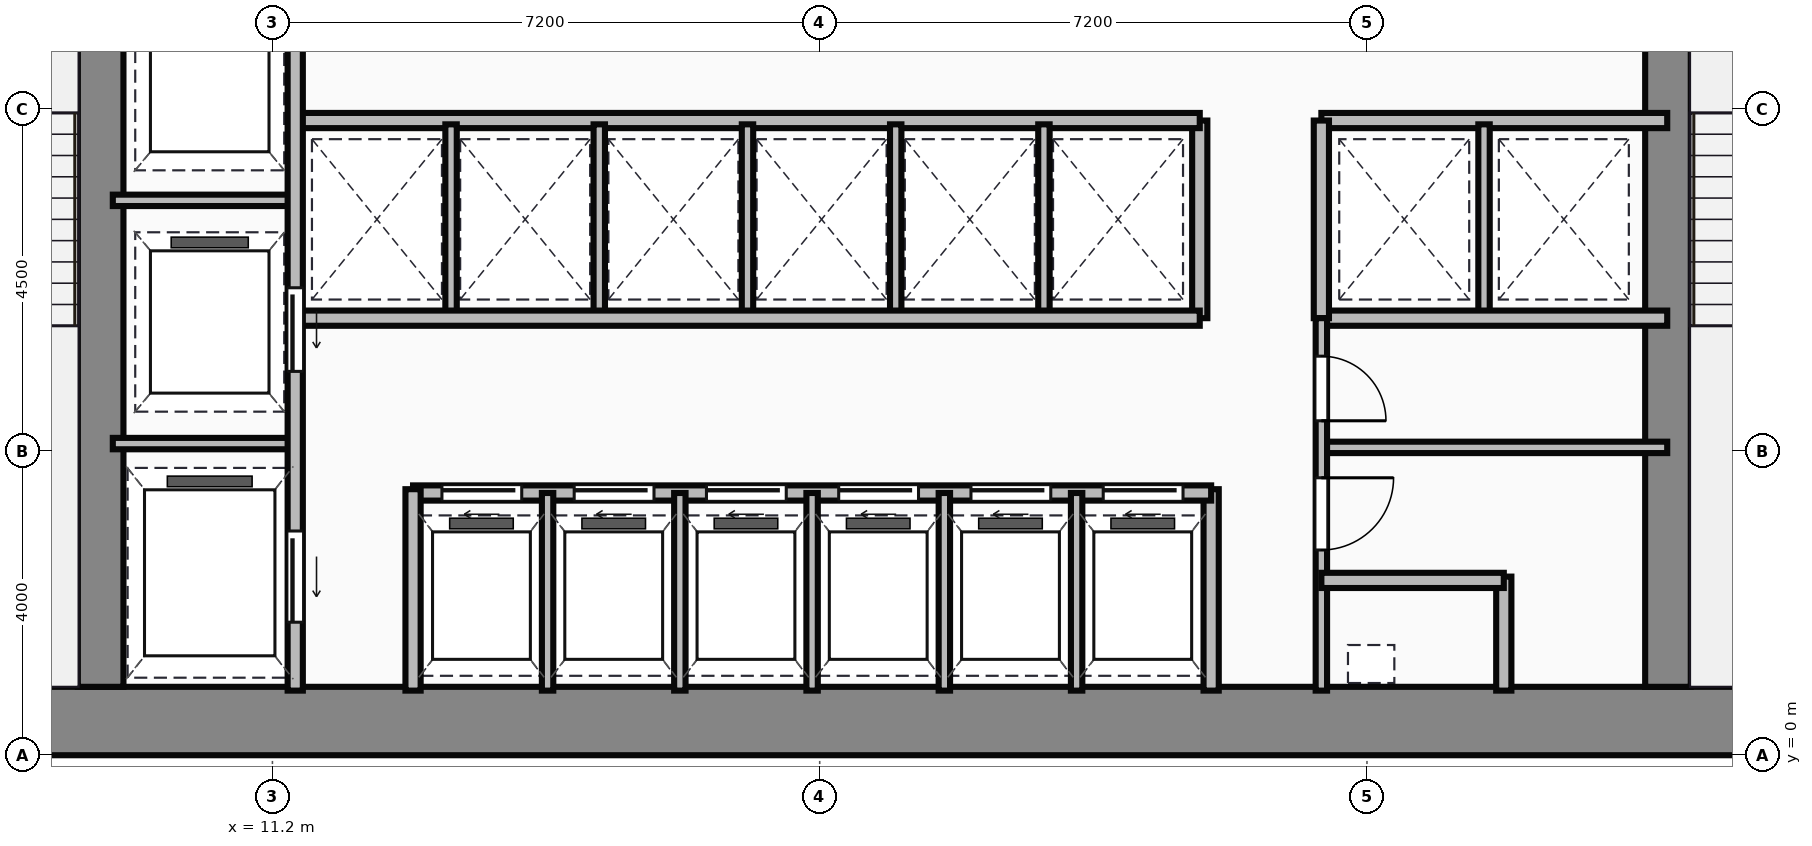
"""IFC4 building model, lengths in metres.
Left out: names, types, materials, properties, quantities, classifications, styles, units other than length and angle.
Written with IfcOpenShell. Run it as: python <this file> out.ifc"""

import sys

from ifc_helpers import new_model, si_unit, direction, frame, frame_2d, origin, place, context, subcontext, project, spatial, rectangle, extrude, source, transform, mapped, element, fill, save


model = new_model("IFC4")
c1 = context("Model", 3, precision=1e-05, world=origin(), true_north=direction((0.0, 1.0)))
c2 = subcontext(c1, "Body", "Model", "MODEL_VIEW")
j1 = project(units=[si_unit("LENGTHUNIT", "METRE"), si_unit("PLANEANGLEUNIT", "RADIAN")], contexts=[c1])
p1 = place(None, origin())
s1 = spatial("IfcSite", under=j1, at=p1, CompositionType="ELEMENT")
p2 = place(p1, origin())
s2 = spatial("IfcBuilding", under=s1, at=p2, CompositionType="ELEMENT")
p3 = place(p2, frame((0.0, 0.0, 54.4)))
s3 = spatial("IfcBuildingStorey", under=s2, at=p3, CompositionType="ELEMENT", Elevation=54.4)
m1 = source(origin(), c2, "Body", "SweptSolid", [
    extrude(rectangle(XDim=29.5, YDim=0.9, at=frame_2d((14.75, 0.0))), origin(), (0.0, 0.0, 1.0), 3.65),
])
p4 = place(p3, frame((4.5, 0.45, 0.0), z_axis=(0.0, 0.0, 1.0), x_axis=(1.0, 0.0, 0.0)))
e1 = element("IfcWall", 1, at=p4, inside=s3, PredefinedType="SHEAR", context=c2, shape_type="MappedRepresentation", body=[
    mapped(m1, transform((0.0, 0.0, 0.0))),
])
m2 = source(origin(), c2, "Body", "SweptSolid", [
    extrude(rectangle(XDim=12.2, YDim=0.6, at=frame_2d((6.1, 0.0))), origin(), (0.0, 0.0, 1.0), 3.65),
])
for number, where, z_axis, x_axis in (
    (2, (8.94, 0.9, 0.0), (0.0, 0.0, 1.0), (0.0, 1.0, 0.0)),
    (3, (29.56, 0.9, 0.0), (0.0, 0.0, 1.0), (0.0, 1.0, 0.0)),
):
    element("IfcWall", number, at=place(p3, frame(where, z_axis=z_axis, x_axis=x_axis)), inside=s3, PredefinedType="SHEAR", context=c2, shape_type="MappedRepresentation", body=[
        mapped(m2, transform((0.0, 0.0, 0.0))),
    ])
m3 = source(origin(), c2, "Body", "SweptSolid", [
    extrude(rectangle(XDim=9.6, YDim=0.2, at=frame_2d((4.8, 0.0))), origin(), (0.0, 0.0, 1.0), 3.4),
])
p5 = place(p3, frame((11.5, 0.85, 0.0), z_axis=(0.0, 0.0, 1.0), x_axis=(0.0, 1.0, 0.0)))
e4 = element("IfcWall", 4, at=p5, inside=s3, PredefinedType="PARTITIONING", context=c2, shape_type="MappedRepresentation", body=[
    mapped(m3, transform((0.0, 0.0, 0.0))),
])
p6 = place(p5, frame((4.2, 0.0, 0.0)))
e5 = element("IfcOpeningElement", 5, at=p6, cuts=e4, PredefinedType="OPENING", context=c2, shape_type="SweptSolid", body=[
    extrude(rectangle(XDim=1.1, YDim=2.15, at=frame_2d((0.55, 1.075))), frame((0.0, 0.11, 0.0), z_axis=(0.0, -1.0, 0.0), x_axis=(1.0, 0.0, 0.0)), (0.0, 0.0, 1.0), 0.22),
])
p7 = place(p5, frame((0.9, 0.0, 0.0)))
e6 = element("IfcOpeningElement", 6, at=p7, cuts=e4, PredefinedType="OPENING", context=c2, shape_type="SweptSolid", body=[
    extrude(rectangle(XDim=1.2, YDim=2.15, at=frame_2d((0.6, 1.075))), frame((0.0, 0.11, 0.0), z_axis=(0.0, -1.0, 0.0), x_axis=(1.0, 0.0, 0.0)), (0.0, 0.0, 1.0), 0.22),
])
m4 = source(origin(), c2, "Body", "SweptSolid", [
    extrude(rectangle(XDim=2.4, YDim=0.15, at=frame_2d((1.2, 0.0))), origin(), (0.0, 0.0, 1.0), 3.4),
])
for number, where, z_axis, x_axis in (
    (7, (9.1, 4.1, 0.0), (0.0, 0.0, 1.0), (1.0, 0.0, 0.0)),
    (8, (9.1, 7.3, 0.0), (0.0, 0.0, 1.0), (1.0, 0.0, 0.0)),
):
    element("IfcWall", number, at=place(p3, frame(where, z_axis=z_axis, x_axis=x_axis)), inside=s3, PredefinedType="PARTITIONING", context=c2, shape_type="MappedRepresentation", body=[
        mapped(m4, transform((0.0, 0.0, 0.0))),
    ])
m5 = source(origin(), c2, "Body", "SweptSolid", [
    extrude(rectangle(XDim=2.65, YDim=0.2, at=frame_2d((1.325, 0.0))), origin(), (0.0, 0.0, 1.0), 3.4),
])
p8 = place(p3, frame((13.05, 0.85, 0.0), z_axis=(0.0, 0.0, 1.0), x_axis=(0.0, 1.0, 0.0)))
e9 = element("IfcWall", 9, at=p8, inside=s3, PredefinedType="PARTITIONING", context=c2, shape_type="MappedRepresentation", body=[
    mapped(m5, transform((0.0, 0.0, 0.0))),
])
m6 = source(origin(), c2, "Body", "SweptSolid", [
    extrude(rectangle(XDim=10.5, YDim=0.2, at=frame_2d((5.25, 0.0))), origin(), (0.0, 0.0, 1.0), 3.4),
])
p9 = place(p3, frame((13.05, 3.45, 0.0), z_axis=(0.0, 0.0, 1.0), x_axis=(1.0, 0.0, 0.0)))
e10 = element("IfcWall", 10, at=p9, inside=s3, PredefinedType="PARTITIONING", context=c2, shape_type="MappedRepresentation", body=[
    mapped(m6, transform((0.0, 0.0, 0.0))),
])
p10 = place(p9, frame((0.38, 0.0, 0.0)))
e11 = element("IfcOpeningElement", 11, at=p10, cuts=e10, PredefinedType="OPENING", context=c2, shape_type="SweptSolid", body=[
    extrude(rectangle(XDim=1.05, YDim=2.15, at=frame_2d((0.525, 1.075))), frame((0.0, 0.11, 0.0), z_axis=(0.0, -1.0, 0.0), x_axis=(1.0, 0.0, 0.0)), (0.0, 0.0, 1.0), 0.22),
])
p11 = place(p9, frame((2.12, 0.0, 0.0)))
e12 = element("IfcOpeningElement", 12, at=p11, cuts=e10, PredefinedType="OPENING", context=c2, shape_type="SweptSolid", body=[
    extrude(rectangle(XDim=1.05, YDim=2.15, at=frame_2d((0.525, 1.075))), frame((0.0, 0.11, 0.0), z_axis=(0.0, -1.0, 0.0), x_axis=(1.0, 0.0, 0.0)), (0.0, 0.0, 1.0), 0.22),
])
p12 = place(p9, frame((3.86, 0.0, 0.0)))
e13 = element("IfcOpeningElement", 13, at=p12, cuts=e10, PredefinedType="OPENING", context=c2, shape_type="SweptSolid", body=[
    extrude(rectangle(XDim=1.05, YDim=2.15, at=frame_2d((0.525, 1.075))), frame((0.0, 0.11, 0.0), z_axis=(0.0, -1.0, 0.0), x_axis=(1.0, 0.0, 0.0)), (0.0, 0.0, 1.0), 0.22),
])
p13 = place(p9, frame((5.6, 0.0, 0.0)))
e14 = element("IfcOpeningElement", 14, at=p13, cuts=e10, PredefinedType="OPENING", context=c2, shape_type="SweptSolid", body=[
    extrude(rectangle(XDim=1.05, YDim=2.15, at=frame_2d((0.525, 1.075))), frame((0.0, 0.11, 0.0), z_axis=(0.0, -1.0, 0.0), x_axis=(1.0, 0.0, 0.0)), (0.0, 0.0, 1.0), 0.22),
])
p14 = place(p9, frame((7.34, 0.0, 0.0)))
e15 = element("IfcOpeningElement", 15, at=p14, cuts=e10, PredefinedType="OPENING", context=c2, shape_type="SweptSolid", body=[
    extrude(rectangle(XDim=1.05, YDim=2.15, at=frame_2d((0.525, 1.075))), frame((0.0, 0.11, 0.0), z_axis=(0.0, -1.0, 0.0), x_axis=(1.0, 0.0, 0.0)), (0.0, 0.0, 1.0), 0.22),
])
p15 = place(p9, frame((9.08, 0.0, 0.0)))
e16 = element("IfcOpeningElement", 16, at=p15, cuts=e10, PredefinedType="OPENING", context=c2, shape_type="SweptSolid", body=[
    extrude(rectangle(XDim=1.05, YDim=2.15, at=frame_2d((0.525, 1.075))), frame((0.0, 0.11, 0.0), z_axis=(0.0, -1.0, 0.0), x_axis=(1.0, 0.0, 0.0)), (0.0, 0.0, 1.0), 0.22),
])
p16 = place(p3, frame((23.55, 0.85, 0.0), z_axis=(0.0, 0.0, 1.0), x_axis=(0.0, 1.0, 0.0)))
e17 = element("IfcWall", 17, at=p16, inside=s3, PredefinedType="PARTITIONING", context=c2, shape_type="MappedRepresentation", body=[
    mapped(m5, transform((0.0, 0.0, 0.0))),
])
m7 = source(origin(), c2, "Body", "SweptSolid", [
    extrude(rectangle(XDim=2.6, YDim=0.15, at=frame_2d((1.3, 0.0))), origin(), (0.0, 0.0, 1.0), 3.4),
])
for number, where, z_axis, x_axis in (
    (18, (14.82, 0.85, 0.0), (0.0, 0.0, 1.0), (0.0, 1.0, 0.0)),
    (19, (16.56, 0.85, 0.0), (0.0, 0.0, 1.0), (0.0, 1.0, 0.0)),
    (20, (18.3, 0.85, 0.0), (0.0, 0.0, 1.0), (0.0, 1.0, 0.0)),
    (21, (20.04, 0.85, 0.0), (0.0, 0.0, 1.0), (0.0, 1.0, 0.0)),
    (22, (21.78, 0.85, 0.0), (0.0, 0.0, 1.0), (0.0, 1.0, 0.0)),
):
    element("IfcWall", number, at=place(p3, frame(where, z_axis=z_axis, x_axis=x_axis)), inside=s3, PredefinedType="PARTITIONING", context=c2, shape_type="MappedRepresentation", body=[
        mapped(m7, transform((0.0, 0.0, 0.0))),
    ])
m8 = source(origin(), c2, "Body", "SweptSolid", [
    extrude(rectangle(XDim=11.85, YDim=0.2, at=frame_2d((5.925, 0.0))), origin(), (0.0, 0.0, 1.0), 3.4),
])
for number, where, z_axis, x_axis in (
    (23, (11.55, 5.75, 0.0), (0.0, 0.0, 1.0), (1.0, 0.0, 0.0)),
    (24, (11.55, 8.35, 0.0), (0.0, 0.0, 1.0), (1.0, 0.0, 0.0)),
):
    element("IfcWall", number, at=place(p3, frame(where, z_axis=z_axis, x_axis=x_axis)), inside=s3, PredefinedType="PARTITIONING", context=c2, shape_type="MappedRepresentation", body=[
        mapped(m8, transform((0.0, 0.0, 0.0))),
    ])
m9 = source(origin(), c2, "Body", "SweptSolid", [
    extrude(rectangle(XDim=2.6, YDim=0.2, at=frame_2d((1.3, 0.0))), origin(), (0.0, 0.0, 1.0), 3.4),
])
p17 = place(p3, frame((23.4, 5.75, 0.0), z_axis=(0.0, 0.0, 1.0), x_axis=(0.0, 1.0, 0.0)))
e25 = element("IfcWall", 25, at=p17, inside=s3, PredefinedType="PARTITIONING", context=c2, shape_type="MappedRepresentation", body=[
    mapped(m9, transform((0.0, 0.0, 0.0))),
])
m10 = source(origin(), c2, "Body", "SweptSolid", [
    extrude(rectangle(XDim=2.5, YDim=0.15, at=frame_2d((1.25, 0.0))), origin(), (0.0, 0.0, 1.0), 3.4),
])
for number, where, z_axis, x_axis in (
    (26, (13.55, 5.8, 0.0), (0.0, 0.0, 1.0), (0.0, 1.0, 0.0)),
    (27, (15.5, 5.8, 0.0), (0.0, 0.0, 1.0), (0.0, 1.0, 0.0)),
    (28, (17.45, 5.8, 0.0), (0.0, 0.0, 1.0), (0.0, 1.0, 0.0)),
    (29, (19.4, 5.8, 0.0), (0.0, 0.0, 1.0), (0.0, 1.0, 0.0)),
    (30, (21.35, 5.8, 0.0), (0.0, 0.0, 1.0), (0.0, 1.0, 0.0)),
):
    element("IfcWall", number, at=place(p3, frame(where, z_axis=z_axis, x_axis=x_axis)), inside=s3, PredefinedType="PARTITIONING", context=c2, shape_type="MappedRepresentation", body=[
        mapped(m10, transform((0.0, 0.0, 0.0))),
    ])
m11 = source(origin(), c2, "Body", "SweptSolid", [
    extrude(rectangle(XDim=4.55, YDim=0.2, at=frame_2d((2.275, 0.0))), origin(), (0.0, 0.0, 1.0), 3.4),
])
for number, where, z_axis, x_axis in (
    (31, (25.0, 8.35, 0.0), (0.0, 0.0, 1.0), (1.0, 0.0, 0.0)),
    (32, (25.0, 5.75, 0.0), (0.0, 0.0, 1.0), (1.0, 0.0, 0.0)),
):
    element("IfcWall", number, at=place(p3, frame(where, z_axis=z_axis, x_axis=x_axis)), inside=s3, PredefinedType="PARTITIONING", context=c2, shape_type="MappedRepresentation", body=[
        mapped(m11, transform((0.0, 0.0, 0.0))),
    ])
p18 = place(p3, frame((25.0, 5.75, 0.0), z_axis=(0.0, 0.0, 1.0), x_axis=(0.0, 1.0, 0.0)))
e33 = element("IfcWall", 33, at=p18, inside=s3, PredefinedType="PARTITIONING", context=c2, shape_type="MappedRepresentation", body=[
    mapped(m9, transform((0.0, 0.0, 0.0))),
])
p19 = place(p3, frame((27.14, 5.8, 0.0), z_axis=(0.0, 0.0, 1.0), x_axis=(0.0, 1.0, 0.0)))
e34 = element("IfcWall", 34, at=p19, inside=s3, PredefinedType="PARTITIONING", context=c2, shape_type="MappedRepresentation", body=[
    mapped(m10, transform((0.0, 0.0, 0.0))),
])
m12 = source(origin(), c2, "Body", "SweptSolid", [
    extrude(rectangle(XDim=4.9, YDim=0.15, at=frame_2d((2.45, 0.0))), origin(), (0.0, 0.0, 1.0), 3.4),
])
p20 = place(p3, frame((25.0, 0.85, 0.0), z_axis=(0.0, 0.0, 1.0), x_axis=(0.0, 1.0, 0.0)))
e35 = element("IfcWall", 35, at=p20, inside=s3, PredefinedType="PARTITIONING", context=c2, shape_type="MappedRepresentation", body=[
    mapped(m12, transform((0.0, 0.0, 0.0))),
])
p21 = place(p20, frame((1.85, 0.0, 0.0)))
e36 = element("IfcOpeningElement", 36, at=p21, cuts=e35, PredefinedType="OPENING", context=c2, shape_type="SweptSolid", body=[
    extrude(rectangle(XDim=0.95, YDim=2.15, at=frame_2d((0.475, 1.075))), frame((0.0, 0.085, 0.0), z_axis=(0.0, -1.0, 0.0), x_axis=(1.0, 0.0, 0.0)), (0.0, 0.0, 1.0), 0.17),
])
p22 = place(p20, frame((3.55, 0.0, 0.0)))
e37 = element("IfcOpeningElement", 37, at=p22, cuts=e35, PredefinedType="OPENING", context=c2, shape_type="SweptSolid", body=[
    extrude(rectangle(XDim=0.85, YDim=2.15, at=frame_2d((0.425, 1.075))), frame((0.0, 0.085, 0.0), z_axis=(0.0, -1.0, 0.0), x_axis=(1.0, 0.0, 0.0)), (0.0, 0.0, 1.0), 0.17),
])
m13 = source(origin(), c2, "Body", "SweptSolid", [
    extrude(rectangle(XDim=2.4, YDim=0.2, at=frame_2d((1.2, 0.0))), origin(), (0.0, 0.0, 1.0), 3.4),
])
p23 = place(p3, frame((25.0, 2.3, 0.0), z_axis=(0.0, 0.0, 1.0), x_axis=(1.0, 0.0, 0.0)))
e38 = element("IfcWall", 38, at=p23, inside=s3, PredefinedType="PARTITIONING", context=c2, shape_type="MappedRepresentation", body=[
    mapped(m13, transform((0.0, 0.0, 0.0))),
])
m14 = source(origin(), c2, "Body", "SweptSolid", [
    extrude(rectangle(XDim=1.5, YDim=0.2, at=frame_2d((0.75, 0.0))), origin(), (0.0, 0.0, 1.0), 3.4),
])
p24 = place(p3, frame((27.4, 0.85, 0.0), z_axis=(0.0, 0.0, 1.0), x_axis=(0.0, 1.0, 0.0)))
e39 = element("IfcWall", 39, at=p24, inside=s3, PredefinedType="PARTITIONING", context=c2, shape_type="MappedRepresentation", body=[
    mapped(m14, transform((0.0, 0.0, 0.0))),
])
m15 = source(origin(), c2, "Body", "SweptSolid", [
    extrude(rectangle(XDim=4.55, YDim=0.15, at=frame_2d((2.275, 0.0))), origin(), (0.0, 0.0, 1.0), 3.4),
])
p25 = place(p3, frame((25.0, 4.05, 0.0), z_axis=(0.0, 0.0, 1.0), x_axis=(1.0, 0.0, 0.0)))
e40 = element("IfcWall", 40, at=p25, inside=s3, PredefinedType="PARTITIONING", context=c2, shape_type="MappedRepresentation", body=[
    mapped(m15, transform((0.0, 0.0, 0.0))),
])
m16 = source(origin(), c2, "Body", "SweptSolid", [
    extrude(rectangle(XDim=1.1, YDim=2.15, at=frame_2d((0.55, 1.075))), frame((0.0, 0.025, 0.0), z_axis=(0.0, -1.0, 0.0), x_axis=(1.0, 0.0, 0.0)), (0.0, 0.0, 1.0), 0.05),
])
p26 = place(p6, frame((1.1, 0.0, 0.0), z_axis=(0.0, 0.0, 1.0), x_axis=(-1.0, 0.0, 0.0)))
e41 = element("IfcDoor", 41, at=p26, inside=s3, OperationType="SLIDING_TO_LEFT", PredefinedType="DOOR", context=c2, shape_type="MappedRepresentation", body=[
    mapped(m16, transform((0.0, 0.0, 0.0))),
])
fill(e5, e41)
m17 = source(origin(), c2, "Body", "SweptSolid", [
    extrude(rectangle(XDim=1.2, YDim=2.15, at=frame_2d((0.6, 1.075))), frame((0.0, 0.025, 0.0), z_axis=(0.0, -1.0, 0.0), x_axis=(1.0, 0.0, 0.0)), (0.0, 0.0, 1.0), 0.05),
])
p27 = place(p7, frame((1.2, 0.0, 0.0), z_axis=(0.0, 0.0, 1.0), x_axis=(-1.0, 0.0, 0.0)))
e42 = element("IfcDoor", 42, at=p27, inside=s3, OperationType="SLIDING_TO_LEFT", PredefinedType="DOOR", context=c2, shape_type="MappedRepresentation", body=[
    mapped(m17, transform((0.0, 0.0, 0.0))),
])
fill(e6, e42)
m18 = source(origin(), c2, "Body", "SweptSolid", [
    extrude(rectangle(XDim=1.05, YDim=2.15, at=frame_2d((0.525, 1.075))), frame((0.0, 0.025, 0.0), z_axis=(0.0, -1.0, 0.0), x_axis=(1.0, 0.0, 0.0)), (0.0, 0.0, 1.0), 0.05),
])
p28 = place(p10, origin())
e43 = element("IfcDoor", 43, at=p28, inside=s3, OperationType="SLIDING_TO_LEFT", PredefinedType="DOOR", context=c2, shape_type="MappedRepresentation", body=[
    mapped(m18, transform((0.0, 0.0, 0.0))),
])
fill(e11, e43)
p29 = place(p11, origin())
e44 = element("IfcDoor", 44, at=p29, inside=s3, OperationType="SLIDING_TO_LEFT", PredefinedType="DOOR", context=c2, shape_type="MappedRepresentation", body=[
    mapped(m18, transform((0.0, 0.0, 0.0))),
])
fill(e12, e44)
p30 = place(p12, origin())
e45 = element("IfcDoor", 45, at=p30, inside=s3, OperationType="SLIDING_TO_LEFT", PredefinedType="DOOR", context=c2, shape_type="MappedRepresentation", body=[
    mapped(m18, transform((0.0, 0.0, 0.0))),
])
fill(e13, e45)
p31 = place(p13, origin())
e46 = element("IfcDoor", 46, at=p31, inside=s3, OperationType="SLIDING_TO_LEFT", PredefinedType="DOOR", context=c2, shape_type="MappedRepresentation", body=[
    mapped(m18, transform((0.0, 0.0, 0.0))),
])
fill(e14, e46)
p32 = place(p14, origin())
e47 = element("IfcDoor", 47, at=p32, inside=s3, OperationType="SLIDING_TO_LEFT", PredefinedType="DOOR", context=c2, shape_type="MappedRepresentation", body=[
    mapped(m18, transform((0.0, 0.0, 0.0))),
])
fill(e15, e47)
p33 = place(p15, origin())
e48 = element("IfcDoor", 48, at=p33, inside=s3, OperationType="SLIDING_TO_LEFT", PredefinedType="DOOR", context=c2, shape_type="MappedRepresentation", body=[
    mapped(m18, transform((0.0, 0.0, 0.0))),
])
fill(e16, e48)
m19 = source(origin(), c2, "Body", "SweptSolid", [
    extrude(rectangle(XDim=0.95, YDim=2.15, at=frame_2d((0.475, 1.075))), frame((0.0, 0.025, 0.0), z_axis=(0.0, -1.0, 0.0), x_axis=(1.0, 0.0, 0.0)), (0.0, 0.0, 1.0), 0.05),
])
p34 = place(p21, origin())
e49 = element("IfcDoor", 49, at=p34, inside=s3, OperationType="SINGLE_SWING_RIGHT", PredefinedType="DOOR", context=c2, shape_type="MappedRepresentation", body=[
    mapped(m19, transform((0.0, 0.0, 0.0))),
])
fill(e36, e49)
m20 = source(origin(), c2, "Body", "SweptSolid", [
    extrude(rectangle(XDim=0.85, YDim=2.15, at=frame_2d((0.425, 1.075))), frame((0.0, 0.025, 0.0), z_axis=(0.0, -1.0, 0.0), x_axis=(1.0, 0.0, 0.0)), (0.0, 0.0, 1.0), 0.05),
])
p35 = place(p22, origin())
e50 = element("IfcDoor", 50, at=p35, inside=s3, OperationType="SINGLE_SWING_LEFT", PredefinedType="DOOR", context=c2, shape_type="MappedRepresentation", body=[
    mapped(m20, transform((0.0, 0.0, 0.0))),
])
fill(e37, e50)
save(model, sys.argv[1])
